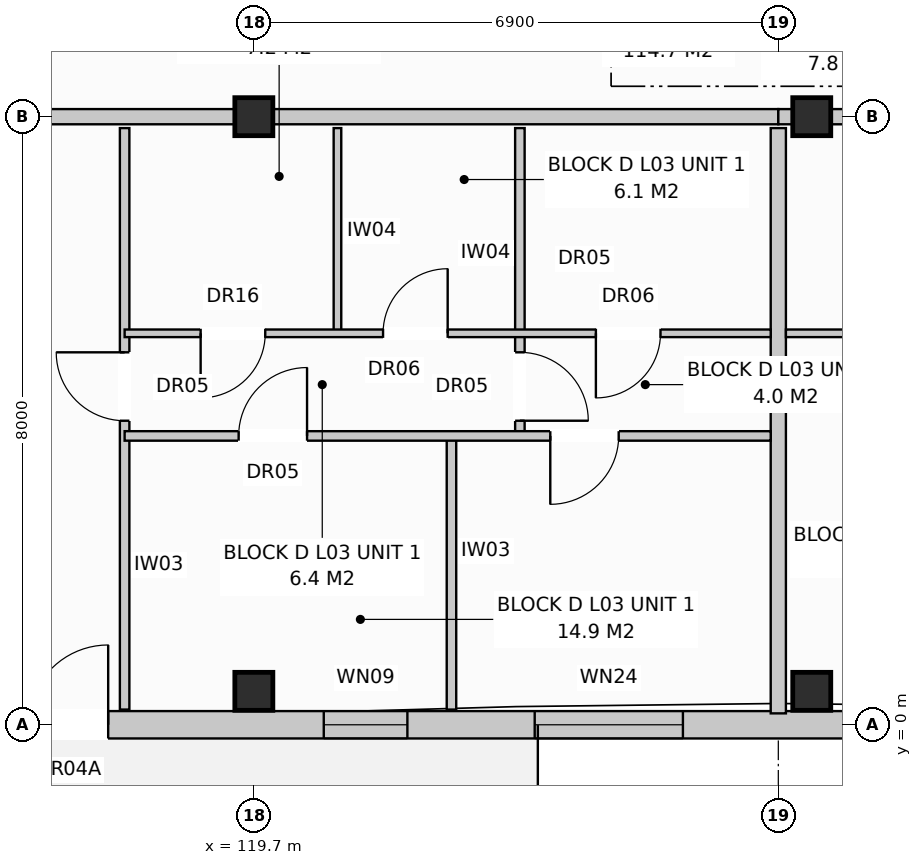
"""IFC4 building model, lengths in metres.
Left out: names, types, materials, properties, quantities, classifications, styles, units other than length and angle.
Written with IfcOpenShell. Run it as: python <this file> out.ifc"""

import sys

from ifc_helpers import new_model, si_unit, direction, frame, frame_2d, origin, origin_with_axes, origin_2d, place, context, subcontext, project, spatial, rectangle, extrude, element, fill, save


model = new_model("IFC4")
c1 = context("Model", 3, precision=1e-05, world=origin(), true_north=direction((0.0, 1.0)))
c2 = subcontext(c1, "Body", "Model", "MODEL_VIEW")
j1 = project(units=[si_unit("LENGTHUNIT", "METRE"), si_unit("PLANEANGLEUNIT", "RADIAN")], contexts=[c1])
p1 = place(None, origin())
s1 = spatial("IfcSite", under=j1, at=p1, CompositionType="ELEMENT")
p2 = place(p1, origin())
s2 = spatial("IfcBuilding", under=s1, at=p2, CompositionType="ELEMENT")
p3 = place(p2, frame((0.0, 0.0, 11.2)))
s3 = spatial("IfcBuildingStorey", under=s2, at=p3, CompositionType="ELEMENT", Elevation=11.2)
for number, where, z_axis, x_axis in (
    (1, (119.7, 0.44, 0.0), (0.0, 0.0, 1.0), (1.0, 0.0, 0.0)),
    (2, (119.7, 8.0, 0.0), (0.0, 0.0, 1.0), (1.0, 0.0, 0.0)),
    (3, (127.04, 0.44, 0.0), (0.0, 0.0, 1.0), (1.0, 0.0, 0.0)),
    (4, (127.04, 8.0, 0.0), (0.0, 0.0, 1.0), (1.0, 0.0, 0.0)),
):
    element("IfcColumn", number, at=place(p3, frame(where, z_axis=z_axis, x_axis=x_axis)), inside=s3, PredefinedType="COLUMN", context=c2, shape_type="SweptSolid", body=[
        extrude(rectangle(XDim=0.5, YDim=0.5, at=origin_2d()), origin(), (0.0, 0.0, 1.0), 3.2),
    ])
p4 = place(p3, frame((112.97, 0.0, 0.0), z_axis=(0.0, 0.0, 1.0), x_axis=(1.0, 0.0, 0.0)))
e5 = element("IfcWall", 5, at=p4, inside=s3, PredefinedType="STANDARD", context=c2, shape_type="SweptSolid", body=[
    extrude(rectangle(XDim=54.86, YDim=0.36, at=frame_2d((27.43, 0.0))), origin(), (0.0, 0.0, 1.0), 2.94),
])
p5 = place(p4, frame((3.764, 0.0, 0.0)))
e6 = element("IfcOpeningElement", 6, at=p5, cuts=e5, PredefinedType="OPENING", context=c2, shape_type="SweptSolid", body=[
    extrude(rectangle(XDim=1.05, YDim=2.12, at=frame_2d((0.525, 1.06))), frame((0.0, 0.192, 0.0), z_axis=(0.0, -1.0, 0.0), x_axis=(1.0, 0.0, 0.0)), (0.0, 0.0, 1.0), 0.384),
])
p6 = place(p4, frame((16.558, 0.0, 0.0)))
e7 = element("IfcOpeningElement", 7, at=p6, cuts=e5, PredefinedType="OPENING", context=c2, shape_type="SweptSolid", body=[
    extrude(rectangle(XDim=1.05, YDim=2.12, at=frame_2d((0.525, 1.06))), frame((0.0, 0.192, 0.0), z_axis=(0.0, -1.0, 0.0), x_axis=(1.0, 0.0, 0.0)), (0.0, 0.0, 1.0), 0.384),
])
p7 = place(p4, frame((30.058, 0.0, 0.0)))
e8 = element("IfcOpeningElement", 8, at=p7, cuts=e5, PredefinedType="OPENING", context=c2, shape_type="SweptSolid", body=[
    extrude(rectangle(XDim=1.05, YDim=2.12, at=frame_2d((0.525, 1.06))), frame((0.0, 0.192, 0.0), z_axis=(0.0, -1.0, 0.0), x_axis=(1.0, 0.0, 0.0)), (0.0, 0.0, 1.0), 0.384),
])
p8 = place(p4, frame((45.158, 0.0, 0.0)))
e9 = element("IfcOpeningElement", 9, at=p8, cuts=e5, PredefinedType="OPENING", context=c2, shape_type="SweptSolid", body=[
    extrude(rectangle(XDim=1.05, YDim=2.12, at=frame_2d((0.525, 1.06))), frame((0.0, 0.192, 0.0), z_axis=(0.0, -1.0, 0.0), x_axis=(1.0, 0.0, 0.0)), (0.0, 0.0, 1.0), 0.384),
])
p9 = place(p4, frame((1.6, 0.0, 0.8)))
e10 = element("IfcOpeningElement", 10, at=p9, cuts=e5, PredefinedType="OPENING", context=c2, shape_type="SweptSolid", body=[
    extrude(rectangle(XDim=1.8, YDim=1.7, at=frame_2d((0.9, 0.85))), frame((0.0, 0.192, 0.0), z_axis=(0.0, -1.0, 0.0), x_axis=(1.0, 0.0, 0.0)), (0.0, 0.0, 1.0), 0.384),
])
p10 = place(p4, frame((7.65, 0.0, 0.72)))
e11 = element("IfcOpeningElement", 11, at=p10, cuts=e5, PredefinedType="OPENING", context=c2, shape_type="SweptSolid", body=[
    extrude(rectangle(XDim=1.1, YDim=1.5, at=frame_2d((0.55, 0.75))), frame((0.0, 0.192, 0.0), z_axis=(0.0, -1.0, 0.0), x_axis=(1.0, 0.0, 0.0)), (0.0, 0.0, 1.0), 0.384),
])
p11 = place(p4, frame((10.425, 0.0, 0.8)))
e12 = element("IfcOpeningElement", 12, at=p11, cuts=e5, PredefinedType="OPENING", context=c2, shape_type="SweptSolid", body=[
    extrude(rectangle(XDim=1.95, YDim=1.65, at=frame_2d((0.975, 0.825))), frame((0.0, 0.192, 0.0), z_axis=(0.0, -1.0, 0.0), x_axis=(1.0, 0.0, 0.0)), (0.0, 0.0, 1.0), 0.384),
])
p12 = place(p4, frame((14.85, 0.0, 0.72)))
e13 = element("IfcOpeningElement", 13, at=p12, cuts=e5, PredefinedType="OPENING", context=c2, shape_type="SweptSolid", body=[
    extrude(rectangle(XDim=1.1, YDim=1.5, at=frame_2d((0.55, 0.75))), frame((0.0, 0.192, 0.0), z_axis=(0.0, -1.0, 0.0), x_axis=(1.0, 0.0, 0.0)), (0.0, 0.0, 1.0), 0.384),
])
p13 = place(p4, frame((18.15, 0.0, 0.72)))
e14 = element("IfcOpeningElement", 14, at=p13, cuts=e5, PredefinedType="OPENING", context=c2, shape_type="SweptSolid", body=[
    extrude(rectangle(XDim=1.9, YDim=1.85, at=frame_2d((0.95, 0.925))), frame((0.0, 0.192, 0.0), z_axis=(0.0, -1.0, 0.0), x_axis=(1.0, 0.0, 0.0)), (0.0, 0.0, 1.0), 0.384),
])
p14 = place(p4, frame((24.25, 0.0, 0.72)))
e15 = element("IfcOpeningElement", 15, at=p14, cuts=e5, PredefinedType="OPENING", context=c2, shape_type="SweptSolid", body=[
    extrude(rectangle(XDim=1.1, YDim=1.5, at=frame_2d((0.55, 0.75))), frame((0.0, 0.192, 0.0), z_axis=(0.0, -1.0, 0.0), x_axis=(1.0, 0.0, 0.0)), (0.0, 0.0, 1.0), 0.384),
])
p15 = place(p4, frame((28.35, 0.0, 0.72)))
e16 = element("IfcOpeningElement", 16, at=p15, cuts=e5, PredefinedType="OPENING", context=c2, shape_type="SweptSolid", body=[
    extrude(rectangle(XDim=1.1, YDim=1.5, at=frame_2d((0.55, 0.75))), frame((0.0, 0.192, 0.0), z_axis=(0.0, -1.0, 0.0), x_axis=(1.0, 0.0, 0.0)), (0.0, 0.0, 1.0), 0.384),
])
p16 = place(p4, frame((31.85, 0.0, 0.72)))
e17 = element("IfcOpeningElement", 17, at=p16, cuts=e5, PredefinedType="OPENING", context=c2, shape_type="SweptSolid", body=[
    extrude(rectangle(XDim=1.9, YDim=1.85, at=frame_2d((0.95, 0.925))), frame((0.0, 0.192, 0.0), z_axis=(0.0, -1.0, 0.0), x_axis=(1.0, 0.0, 0.0)), (0.0, 0.0, 1.0), 0.384),
])
p17 = place(p4, frame((35.325, 0.0, 0.8)))
e18 = element("IfcOpeningElement", 18, at=p17, cuts=e5, PredefinedType="OPENING", context=c2, shape_type="SweptSolid", body=[
    extrude(rectangle(XDim=1.95, YDim=1.65, at=frame_2d((0.975, 0.825))), frame((0.0, 0.192, 0.0), z_axis=(0.0, -1.0, 0.0), x_axis=(1.0, 0.0, 0.0)), (0.0, 0.0, 1.0), 0.384),
])
p18 = place(p4, frame((39.15, 0.0, 0.72)))
e19 = element("IfcOpeningElement", 19, at=p18, cuts=e5, PredefinedType="OPENING", context=c2, shape_type="SweptSolid", body=[
    extrude(rectangle(XDim=1.1, YDim=1.5, at=frame_2d((0.55, 0.75))), frame((0.0, 0.192, 0.0), z_axis=(0.0, -1.0, 0.0), x_axis=(1.0, 0.0, 0.0)), (0.0, 0.0, 1.0), 0.384),
])
p19 = place(p4, frame((42.95, 0.0, 0.8)))
e20 = element("IfcOpeningElement", 20, at=p19, cuts=e5, PredefinedType="OPENING", context=c2, shape_type="SweptSolid", body=[
    extrude(rectangle(XDim=1.9, YDim=1.85, at=frame_2d((0.95, 0.925))), frame((0.0, 0.192, 0.0), z_axis=(0.0, -1.0, 0.0), x_axis=(1.0, 0.0, 0.0)), (0.0, 0.0, 1.0), 0.384),
])
p20 = place(p4, frame((48.583, 0.0, 0.8)))
e21 = element("IfcOpeningElement", 21, at=p20, cuts=e5, PredefinedType="OPENING", context=c2, shape_type="SweptSolid", body=[
    extrude(rectangle(XDim=1.95, YDim=1.65, at=frame_2d((0.975, 0.825))), frame((0.0, 0.192, 0.0), z_axis=(0.0, -1.0, 0.0), x_axis=(1.0, 0.0, 0.0)), (0.0, 0.0, 1.0), 0.384),
])
p21 = place(p4, frame((52.25, 0.0, 0.72)))
e22 = element("IfcOpeningElement", 22, at=p21, cuts=e5, PredefinedType="OPENING", context=c2, shape_type="SweptSolid", body=[
    extrude(rectangle(XDim=1.1, YDim=1.5, at=frame_2d((0.55, 0.75))), frame((0.0, 0.192, 0.0), z_axis=(0.0, -1.0, 0.0), x_axis=(1.0, 0.0, 0.0)), (0.0, 0.0, 1.0), 0.384),
])
p22 = place(p3, frame((126.6, 7.85, 0.0), z_axis=(0.0, 0.0, 1.0), x_axis=(0.0, -1.0, 0.0)))
e23 = element("IfcWall", 23, at=p22, inside=s3, PredefinedType="PARTITIONING", context=c2, shape_type="SweptSolid", body=[
    extrude(rectangle(XDim=7.7, YDim=0.2, at=frame_2d((3.85, 0.0))), origin(), (0.0, 0.0, 1.0), 2.94),
])
p23 = place(p3, frame((112.8, 8.0, 0.0), z_axis=(0.0, 0.0, 1.0), x_axis=(1.0, 0.0, 0.0)))
e24 = element("IfcWall", 24, at=p23, inside=s3, PredefinedType="PARTITIONING", context=c2, shape_type="SweptSolid", body=[
    extrude(rectangle(XDim=13.8, YDim=0.2, at=frame_2d((6.9, 0.0))), origin(), (0.0, 0.0, 1.0), 2.38),
])
p24 = place(p23, frame((2.4, 0.0, 0.0)))
e25 = element("IfcOpeningElement", 25, at=p24, cuts=e24, PredefinedType="OPENING", context=c2, shape_type="SweptSolid", body=[
    extrude(rectangle(XDim=0.95, YDim=2.15, at=frame_2d((0.475, 1.075))), frame((0.0, 0.112, 0.0), z_axis=(0.0, -1.0, 0.0), x_axis=(1.0, 0.0, 0.0)), (0.0, 0.0, 1.0), 0.224),
])
p25 = place(p3, frame((118.0, 7.85, 0.0), z_axis=(0.0, 0.0, 1.0), x_axis=(0.0, -1.0, 0.0)))
e26 = element("IfcWall", 26, at=p25, inside=s3, PredefinedType="PARTITIONING", context=c2, shape_type="SweptSolid", body=[
    extrude(rectangle(XDim=7.65, YDim=0.125, at=frame_2d((3.825, 0.0))), origin(), (0.0, 0.0, 1.0), 2.94),
])
p26 = place(p25, frame((2.95, 0.0, 0.0)))
e27 = element("IfcOpeningElement", 27, at=p26, cuts=e26, PredefinedType="OPENING", context=c2, shape_type="SweptSolid", body=[
    extrude(rectangle(XDim=0.9, YDim=2.1, at=frame_2d((0.45, 1.05))), frame((0.0, 0.074, 0.0), z_axis=(0.0, -1.0, 0.0), x_axis=(1.0, 0.0, 0.0)), (0.0, 0.0, 1.0), 0.149),
])
p27 = place(p3, frame((120.8, 7.85, 0.0), z_axis=(0.0, 0.0, 1.0), x_axis=(0.0, -1.0, 0.0)))
e28 = element("IfcWall", 28, at=p27, inside=s3, PredefinedType="PARTITIONING", context=c2, shape_type="SweptSolid", body=[
    extrude(rectangle(XDim=2.7, YDim=0.1, at=frame_2d((1.35, 0.0))), origin(), (0.0, 0.0, 1.0), 2.94),
])
p28 = place(p3, frame((123.2, 7.85, 0.0), z_axis=(0.0, 0.0, 1.0), x_axis=(0.0, -1.0, 0.0)))
e29 = element("IfcWall", 29, at=p28, inside=s3, PredefinedType="PARTITIONING", context=c2, shape_type="SweptSolid", body=[
    extrude(rectangle(XDim=4.05, YDim=0.125, at=frame_2d((2.025, 0.0))), origin(), (0.0, 0.0, 1.0), 2.94),
])
p29 = place(p28, frame((2.95, 0.0, 0.0)))
e30 = element("IfcOpeningElement", 30, at=p29, cuts=e29, PredefinedType="OPENING", context=c2, shape_type="SweptSolid", body=[
    extrude(rectangle(XDim=0.9, YDim=2.1, at=frame_2d((0.45, 1.05))), frame((0.0, 0.074, 0.0), z_axis=(0.0, -1.0, 0.0), x_axis=(1.0, 0.0, 0.0)), (0.0, 0.0, 1.0), 0.149),
])
p30 = place(p3, frame((122.3, 3.8, 0.0), z_axis=(0.0, 0.0, 1.0), x_axis=(0.0, -1.0, 0.0)))
e31 = element("IfcWall", 31, at=p30, inside=s3, PredefinedType="PARTITIONING", context=c2, shape_type="SweptSolid", body=[
    extrude(rectangle(XDim=3.6, YDim=0.125, at=frame_2d((1.8, 0.0))), origin(), (0.0, 0.0, 1.0), 2.59),
])
p31 = place(p3, frame((118.0, 5.15, 0.0), z_axis=(0.0, 0.0, 1.0), x_axis=(1.0, 0.0, 0.0)))
e32 = element("IfcWall", 32, at=p31, inside=s3, PredefinedType="PARTITIONING", context=c2, shape_type="SweptSolid", body=[
    extrude(rectangle(XDim=8.5, YDim=0.1, at=frame_2d((4.25, 0.0))), origin(), (0.0, 0.0, 1.0), 2.94),
])
p32 = place(p31, frame((1.0, 0.0, 0.0)))
e33 = element("IfcOpeningElement", 33, at=p32, cuts=e32, PredefinedType="OPENING", context=c2, shape_type="SweptSolid", body=[
    extrude(rectangle(XDim=0.85, YDim=2.1, at=frame_2d((0.425, 1.05))), frame((0.0, 0.062, 0.0), z_axis=(0.0, -1.0, 0.0), x_axis=(1.0, 0.0, 0.0)), (0.0, 0.0, 1.0), 0.124),
])
p33 = place(p31, frame((3.4, 0.0, 0.0)))
e34 = element("IfcOpeningElement", 34, at=p33, cuts=e32, PredefinedType="OPENING", context=c2, shape_type="SweptSolid", body=[
    extrude(rectangle(XDim=0.85, YDim=2.05, at=frame_2d((0.425, 1.025))), frame((0.0, 0.062, 0.0), z_axis=(0.0, -1.0, 0.0), x_axis=(1.0, 0.0, 0.0)), (0.0, 0.0, 1.0), 0.124),
])
p34 = place(p31, frame((6.2, 0.0, 0.0)))
e35 = element("IfcOpeningElement", 35, at=p34, cuts=e32, PredefinedType="OPENING", context=c2, shape_type="SweptSolid", body=[
    extrude(rectangle(XDim=0.85, YDim=2.05, at=frame_2d((0.425, 1.025))), frame((0.0, 0.062, 0.0), z_axis=(0.0, -1.0, 0.0), x_axis=(1.0, 0.0, 0.0)), (0.0, 0.0, 1.0), 0.124),
])
p35 = place(p3, frame((118.0, 3.8, 0.0), z_axis=(0.0, 0.0, 1.0), x_axis=(1.0, 0.0, 0.0)))
e36 = element("IfcWall", 36, at=p35, inside=s3, PredefinedType="PARTITIONING", context=c2, shape_type="SweptSolid", body=[
    extrude(rectangle(XDim=8.5, YDim=0.125, at=frame_2d((4.25, 0.0))), origin(), (0.0, 0.0, 1.0), 2.94),
])
p36 = place(p35, frame((1.5, 0.0, 0.0)))
e37 = element("IfcOpeningElement", 37, at=p36, cuts=e36, PredefinedType="OPENING", context=c2, shape_type="SweptSolid", body=[
    extrude(rectangle(XDim=0.9, YDim=2.1, at=frame_2d((0.45, 1.05))), frame((0.0, 0.074, 0.0), z_axis=(0.0, -1.0, 0.0), x_axis=(1.0, 0.0, 0.0)), (0.0, 0.0, 1.0), 0.149),
])
p37 = place(p35, frame((5.6, 0.0, 0.0)))
e38 = element("IfcOpeningElement", 38, at=p37, cuts=e36, PredefinedType="OPENING", context=c2, shape_type="SweptSolid", body=[
    extrude(rectangle(XDim=0.9, YDim=2.1, at=frame_2d((0.45, 1.05))), frame((0.0, 0.074, 0.0), z_axis=(0.0, -1.0, 0.0), x_axis=(1.0, 0.0, 0.0)), (0.0, 0.0, 1.0), 0.149),
])
p38 = place(p3, frame((126.6, 8.0, 0.0), z_axis=(0.0, 0.0, 1.0), x_axis=(1.0, 0.0, 0.0)))
e39 = element("IfcWall", 39, at=p38, inside=s3, PredefinedType="PARTITIONING", context=c2, shape_type="SweptSolid", body=[
    extrude(rectangle(XDim=13.8, YDim=0.2, at=frame_2d((6.9, 0.0))), origin(), (0.0, 0.0, 1.0), 2.38),
])
p39 = place(p38, frame((9.6, 0.0, 0.0)))
e40 = element("IfcOpeningElement", 40, at=p39, cuts=e39, PredefinedType="OPENING", context=c2, shape_type="SweptSolid", body=[
    extrude(rectangle(XDim=0.95, YDim=2.15, at=frame_2d((0.475, 1.075))), frame((0.0, 0.112, 0.0), z_axis=(0.0, -1.0, 0.0), x_axis=(1.0, 0.0, 0.0)), (0.0, 0.0, 1.0), 0.224),
])
p40 = place(p3, frame((126.7, 5.15, 0.0), z_axis=(0.0, 0.0, 1.0), x_axis=(1.0, 0.0, 0.0)))
e41 = element("IfcWall", 41, at=p40, inside=s3, PredefinedType="PARTITIONING", context=c2, shape_type="SweptSolid", body=[
    extrude(rectangle(XDim=8.6, YDim=0.1, at=frame_2d((4.3, 0.0))), origin(), (0.0, 0.0, 1.0), 2.94),
])
p41 = place(p40, frame((1.4, 0.0, 0.0)))
e42 = element("IfcOpeningElement", 42, at=p41, cuts=e41, PredefinedType="OPENING", context=c2, shape_type="SweptSolid", body=[
    extrude(rectangle(XDim=0.85, YDim=2.05, at=frame_2d((0.425, 1.025))), frame((0.0, 0.062, 0.0), z_axis=(0.0, -1.0, 0.0), x_axis=(1.0, 0.0, 0.0)), (0.0, 0.0, 1.0), 0.124),
])
p42 = place(p40, frame((4.65, 0.0, 0.0)))
e43 = element("IfcOpeningElement", 43, at=p42, cuts=e41, PredefinedType="OPENING", context=c2, shape_type="SweptSolid", body=[
    extrude(rectangle(XDim=0.85, YDim=2.05, at=frame_2d((0.425, 1.025))), frame((0.0, 0.062, 0.0), z_axis=(0.0, -1.0, 0.0), x_axis=(1.0, 0.0, 0.0)), (0.0, 0.0, 1.0), 0.124),
])
p43 = place(p40, frame((6.8, 0.0, 0.0)))
e44 = element("IfcOpeningElement", 44, at=p43, cuts=e41, PredefinedType="OPENING", context=c2, shape_type="SweptSolid", body=[
    extrude(rectangle(XDim=0.85, YDim=2.1, at=frame_2d((0.425, 1.05))), frame((0.0, 0.062, 0.0), z_axis=(0.0, -1.0, 0.0), x_axis=(1.0, 0.0, 0.0)), (0.0, 0.0, 1.0), 0.124),
])
p44 = place(p5, origin_with_axes())
e45 = element("IfcDoor", 45, at=p44, inside=s3, OperationType="SINGLE_SWING_RIGHT", PredefinedType="DOOR", context=c2, shape_type="SweptSolid", body=[
    extrude(rectangle(XDim=1.05, YDim=2.12, at=frame_2d((0.525, 1.06))), frame((0.0, 0.025, 0.0), z_axis=(0.0, -1.0, 0.0), x_axis=(1.0, 0.0, 0.0)), (0.0, 0.0, 1.0), 0.05),
])
fill(e6, e45)
p45 = place(p10, origin_with_axes())
e46 = element("IfcWindow", 46, at=p45, inside=s3, PartitioningType="SINGLE_PANEL", PredefinedType="WINDOW", context=c2, shape_type="SweptSolid", body=[
    extrude(rectangle(XDim=1.1, YDim=1.5, at=frame_2d((0.55, 0.75))), frame((0.0, 0.03, 0.0), z_axis=(0.0, -1.0, 0.0), x_axis=(1.0, 0.0, 0.0)), (0.0, 0.0, 1.0), 0.06),
])
fill(e11, e46)
p46 = place(p11, origin_with_axes())
e47 = element("IfcWindow", 47, at=p46, inside=s3, PartitioningType="SINGLE_PANEL", PredefinedType="WINDOW", context=c2, shape_type="SweptSolid", body=[
    extrude(rectangle(XDim=1.95, YDim=1.65, at=frame_2d((0.975, 0.825))), frame((0.0, 0.03, 0.0), z_axis=(0.0, -1.0, 0.0), x_axis=(1.0, 0.0, 0.0)), (0.0, 0.0, 1.0), 0.06),
])
fill(e12, e47)
p47 = place(p26, frame((0.9, 0.0, 0.0), z_axis=(0.0, 0.0, 1.0), x_axis=(-1.0, 0.0, 0.0)))
e48 = element("IfcDoor", 48, at=p47, inside=s3, OperationType="SINGLE_SWING_LEFT", PredefinedType="DOOR", context=c2, shape_type="SweptSolid", body=[
    extrude(rectangle(XDim=0.9, YDim=2.1, at=frame_2d((0.45, 1.05))), frame((0.0, 0.025, 0.0), z_axis=(0.0, -1.0, 0.0), x_axis=(1.0, 0.0, 0.0)), (0.0, 0.0, 1.0), 0.05),
])
fill(e27, e48)
p48 = place(p29, origin_with_axes())
e49 = element("IfcDoor", 49, at=p48, inside=s3, OperationType="SINGLE_SWING_RIGHT", PredefinedType="DOOR", context=c2, shape_type="SweptSolid", body=[
    extrude(rectangle(XDim=0.9, YDim=2.1, at=frame_2d((0.45, 1.05))), frame((0.0, 0.025, 0.0), z_axis=(0.0, -1.0, 0.0), x_axis=(1.0, 0.0, 0.0)), (0.0, 0.0, 1.0), 0.05),
])
fill(e30, e49)
p49 = place(p32, frame((0.85, 0.0, 0.0), z_axis=(0.0, 0.0, 1.0), x_axis=(-1.0, 0.0, 0.0)))
e50 = element("IfcDoor", 50, at=p49, inside=s3, OperationType="SINGLE_SWING_LEFT", PredefinedType="DOOR", context=c2, shape_type="SweptSolid", body=[
    extrude(rectangle(XDim=0.85, YDim=2.1, at=frame_2d((0.425, 1.05))), frame((0.0, 0.025, 0.0), z_axis=(0.0, -1.0, 0.0), x_axis=(1.0, 0.0, 0.0)), (0.0, 0.0, 1.0), 0.05),
])
fill(e33, e50)
p50 = place(p33, origin_with_axes())
e51 = element("IfcDoor", 51, at=p50, inside=s3, OperationType="SINGLE_SWING_RIGHT", PredefinedType="DOOR", context=c2, shape_type="SweptSolid", body=[
    extrude(rectangle(XDim=0.85, YDim=2.05, at=frame_2d((0.425, 1.025))), frame((0.0, 0.025, 0.0), z_axis=(0.0, -1.0, 0.0), x_axis=(1.0, 0.0, 0.0)), (0.0, 0.0, 1.0), 0.05),
])
fill(e34, e51)
p51 = place(p34, frame((0.85, 0.0, 0.0), z_axis=(0.0, 0.0, 1.0), x_axis=(-1.0, 0.0, 0.0)))
e52 = element("IfcDoor", 52, at=p51, inside=s3, OperationType="SINGLE_SWING_LEFT", PredefinedType="DOOR", context=c2, shape_type="SweptSolid", body=[
    extrude(rectangle(XDim=0.85, YDim=2.05, at=frame_2d((0.425, 1.025))), frame((0.0, 0.025, 0.0), z_axis=(0.0, -1.0, 0.0), x_axis=(1.0, 0.0, 0.0)), (0.0, 0.0, 1.0), 0.05),
])
fill(e35, e52)
p52 = place(p36, origin_with_axes())
e53 = element("IfcDoor", 53, at=p52, inside=s3, OperationType="SINGLE_SWING_RIGHT", PredefinedType="DOOR", context=c2, shape_type="SweptSolid", body=[
    extrude(rectangle(XDim=0.9, YDim=2.1, at=frame_2d((0.45, 1.05))), frame((0.0, 0.025, 0.0), z_axis=(0.0, -1.0, 0.0), x_axis=(1.0, 0.0, 0.0)), (0.0, 0.0, 1.0), 0.05),
])
fill(e37, e53)
p53 = place(p37, frame((0.9, 0.0, 0.0), z_axis=(0.0, 0.0, 1.0), x_axis=(-1.0, 0.0, 0.0)))
e54 = element("IfcDoor", 54, at=p53, inside=s3, OperationType="SINGLE_SWING_LEFT", PredefinedType="DOOR", context=c2, shape_type="SweptSolid", body=[
    extrude(rectangle(XDim=0.9, YDim=2.1, at=frame_2d((0.45, 1.05))), frame((0.0, 0.025, 0.0), z_axis=(0.0, -1.0, 0.0), x_axis=(1.0, 0.0, 0.0)), (0.0, 0.0, 1.0), 0.05),
])
fill(e38, e54)
save(model, sys.argv[1])
